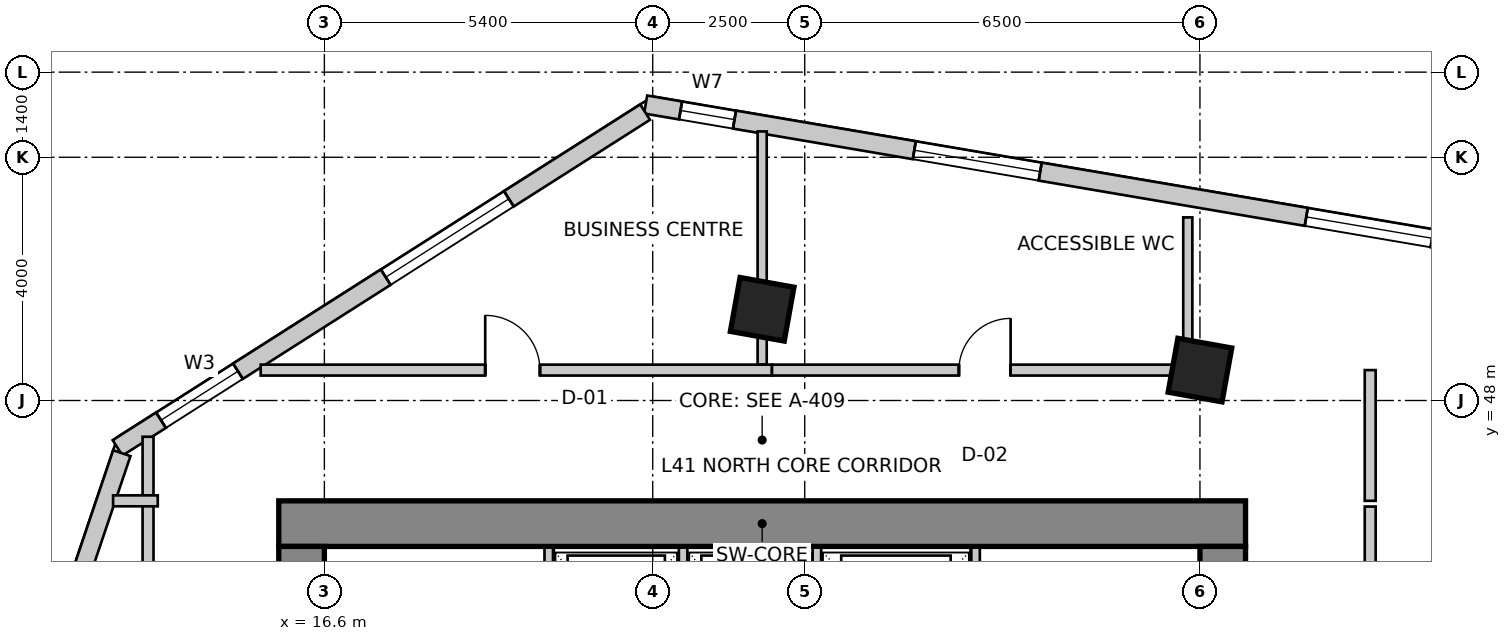
"""IFC4 building model, lengths in metres.
Left out: names, types, materials, properties, quantities, classifications, styles, units other than length and angle.
Written with IfcOpenShell. Run it as: python <this file> out.ifc"""

import sys

from ifc_helpers import new_model, si_unit, direction, frame, frame_2d, origin, origin_2d, place, context, subcontext, project, spatial, rectangle, extrude, source, transform, mapped, element, fill, save


model = new_model("IFC4")
c1 = context("Model", 3, precision=1e-05, world=origin(), true_north=direction((0.0, 1.0)))
c2 = subcontext(c1, "Body", "Model", "MODEL_VIEW")
j1 = project(units=[si_unit("LENGTHUNIT", "METRE"), si_unit("PLANEANGLEUNIT", "RADIAN")], contexts=[c1])
p1 = place(None, origin())
s1 = spatial("IfcSite", under=j1, at=p1, CompositionType="ELEMENT")
p2 = place(p1, origin())
s2 = spatial("IfcBuilding", under=s1, at=p2, CompositionType="ELEMENT")
p3 = place(p2, frame((0.0, 0.0, 164.6)))
s3 = spatial("IfcBuildingStorey", under=s2, at=p3, CompositionType="ELEMENT", Elevation=164.6)
p4 = place(p3, frame((15.85, 45.975, 0.0), z_axis=(0.0, 0.0, 1.0), x_axis=(1.0, 0.0, 0.0)))
e1 = element("IfcWall", 1, at=p4, inside=s3, PredefinedType="SHEAR", context=c2, shape_type="SweptSolid", body=[
    extrude(rectangle(XDim=15.9, YDim=0.75, at=frame_2d((7.95, 0.0))), origin(), (0.0, 0.0, 1.0), 3.6),
])
p5 = place(p3, frame((16.225, 34.2, 0.0), z_axis=(0.0, 0.0, 1.0), x_axis=(0.0, 1.0, 0.0)))
e2 = element("IfcWall", 2, at=p5, inside=s3, PredefinedType="SHEAR", context=c2, shape_type="SweptSolid", body=[
    extrude(rectangle(XDim=11.4, YDim=0.75, at=frame_2d((5.7, 0.0))), origin(), (0.0, 0.0, 1.0), 3.6),
])
m1 = source(origin(), c2, "Body", "SweptSolid", [
    extrude(rectangle(XDim=1.1, YDim=2.15, at=frame_2d((0.55, 1.075))), frame((0.0, 0.385, 0.0), z_axis=(0.0, -1.0, 0.0), x_axis=(1.0, 0.0, 0.0)), (0.0, 0.0, 1.0), 0.77),
])
p6 = place(p5, frame((7.15, 0.0, 0.0)))
e3 = element("IfcOpeningElement", 3, at=p6, cuts=e2, PredefinedType="OPENING", context=c2, shape_type="MappedRepresentation", body=[
    mapped(m1, transform((0.0, 0.0, 0.0), scale=1.0)),
])
p7 = place(p3, frame((31.375, 34.2, 0.0), z_axis=(0.0, 0.0, 1.0), x_axis=(0.0, 1.0, 0.0)))
e4 = element("IfcWall", 4, at=p7, inside=s3, PredefinedType="SHEAR", context=c2, shape_type="SweptSolid", body=[
    extrude(rectangle(XDim=11.4, YDim=0.75, at=frame_2d((5.7, 0.0))), origin(), (0.0, 0.0, 1.0), 3.6),
])
p8 = place(p7, frame((7.35, 0.0, 0.0)))
e5 = element("IfcOpeningElement", 5, at=p8, cuts=e4, PredefinedType="OPENING", context=c2, shape_type="MappedRepresentation", body=[
    mapped(m1, transform((0.0, 0.0, 0.0), scale=1.0)),
])
m2 = source(origin(), c2, "Body", "SweptSolid", [
    extrude(rectangle(XDim=0.9, YDim=0.9, at=origin_2d()), origin(), (0.0, 0.0, 1.0), 3.6),
])
for number, where, z_axis, x_axis in (
    (6, (23.8, 49.5, 0.0), (0.0, 0.0, 1.0), (0.984, -0.177, 0.0)),
    (7, (31.0, 48.5, 0.0), (0.0, 0.0, 1.0), (0.984, -0.177, 0.0)),
):
    element("IfcColumn", number, at=place(p3, frame(where, z_axis=z_axis, x_axis=x_axis)), inside=s3, PredefinedType="COLUMN", context=c2, shape_type="MappedRepresentation", body=[
        mapped(m2, transform((0.0, 0.0, 0.0), scale=1.0)),
    ])
p9 = place(p3, frame((53.561, 47.48, 0.0), z_axis=(0.0, 0.0, 1.0), x_axis=(-0.985845173895, 0.167658262868, 0.0)))
e8 = element("IfcWall", 8, at=p9, inside=s3, PredefinedType="SOLIDWALL", context=c2, shape_type="SweptSolid", body=[
    extrude(rectangle(XDim=32.132, YDim=0.3, at=frame_2d((16.066, 0.0))), origin(), (0.0, 0.0, 1.0), 3.35),
])
m3 = source(origin(), c2, "Body", "SweptSolid", [
    extrude(rectangle(XDim=2.1, YDim=2.0, at=frame_2d((1.05, 1.0))), frame((0.0, 0.16, 0.0), z_axis=(0.0, -1.0, 0.0), x_axis=(1.0, 0.0, 0.0)), (0.0, 0.0, 1.0), 0.32),
])
p10 = place(p9, frame((2.046, 0.0, 0.85)))
e9 = element("IfcOpeningElement", 9, at=p10, cuts=e8, PredefinedType="OPENING", context=c2, shape_type="MappedRepresentation", body=[
    mapped(m3, transform((0.0, 0.0, 0.0), scale=1.0)),
])
p11 = place(p9, frame((8.013, 0.0, 0.85)))
e10 = element("IfcOpeningElement", 10, at=p11, cuts=e8, PredefinedType="OPENING", context=c2, shape_type="MappedRepresentation", body=[
    mapped(m3, transform((0.0, 0.0, 0.0), scale=1.0)),
])
m4 = source(origin(), c2, "Body", "SweptSolid", [
    extrude(rectangle(XDim=2.4, YDim=2.2, at=frame_2d((1.2, 1.1))), frame((0.0, 0.16, 0.0), z_axis=(0.0, -1.0, 0.0), x_axis=(1.0, 0.0, 0.0)), (0.0, 0.0, 1.0), 0.32),
])
p12 = place(p9, frame((13.362, 0.0, 0.85)))
e11 = element("IfcOpeningElement", 11, at=p12, cuts=e8, PredefinedType="OPENING", context=c2, shape_type="MappedRepresentation", body=[
    mapped(m4, transform((0.0, 0.0, 0.0), scale=1.0)),
])
p13 = place(p9, frame((19.011, 0.0, 0.85)))
e12 = element("IfcOpeningElement", 12, at=p13, cuts=e8, PredefinedType="OPENING", context=c2, shape_type="MappedRepresentation", body=[
    mapped(m3, transform((0.0, 0.0, 0.0), scale=1.0)),
])
p14 = place(p9, frame((25.55, 0.0, 0.85)))
e13 = element("IfcOpeningElement", 13, at=p14, cuts=e8, PredefinedType="OPENING", context=c2, shape_type="MappedRepresentation", body=[
    mapped(m3, transform((0.0, 0.0, 0.0), scale=1.0)),
])
m5 = source(origin(), c2, "Body", "SweptSolid", [
    extrude(rectangle(XDim=0.9, YDim=1.6, at=frame_2d((0.45, 0.8))), frame((0.0, 0.16, 0.0), z_axis=(0.0, -1.0, 0.0), x_axis=(1.0, 0.0, 0.0)), (0.0, 0.0, 1.0), 0.32),
])
p15 = place(p9, frame((30.65, 0.0, 0.85)))
e14 = element("IfcOpeningElement", 14, at=p15, cuts=e8, PredefinedType="OPENING", context=c2, shape_type="MappedRepresentation", body=[
    mapped(m5, transform((0.0, 0.0, 0.0), scale=1.0)),
])
p16 = place(p3, frame((21.875, 52.742, 0.0), z_axis=(0.0, 0.0, 1.0), x_axis=(-0.843662465249, -0.536873956092, 0.0)))
e15 = element("IfcWall", 15, at=p16, inside=s3, PredefinedType="SOLIDWALL", context=c2, shape_type="SweptSolid", body=[
    extrude(rectangle(XDim=10.284, YDim=0.3, at=frame_2d((5.142, 0.0))), origin(), (0.0, 0.0, 1.0), 3.35),
])
p17 = place(p16, frame((2.656, 0.0, 0.85)))
e16 = element("IfcOpeningElement", 16, at=p17, cuts=e15, PredefinedType="OPENING", context=c2, shape_type="MappedRepresentation", body=[
    mapped(m4, transform((0.0, 0.0, 0.0), scale=1.0)),
])
m6 = source(origin(), c2, "Body", "SweptSolid", [
    extrude(rectangle(XDim=1.5, YDim=1.8, at=frame_2d((0.75, 0.9))), frame((0.0, 0.16, 0.0), z_axis=(0.0, -1.0, 0.0), x_axis=(1.0, 0.0, 0.0)), (0.0, 0.0, 1.0), 0.32),
])
p18 = place(p16, frame((7.937, 0.0, 0.85)))
e17 = element("IfcOpeningElement", 17, at=p18, cuts=e15, PredefinedType="OPENING", context=c2, shape_type="MappedRepresentation", body=[
    mapped(m6, transform((0.0, 0.0, 0.0), scale=1.0)),
])
p19 = place(p3, frame((13.269, 47.134, 0.0), z_axis=(0.0, 0.0, 1.0), x_axis=(-0.319929773322, -0.947441259468, 0.0)))
e18 = element("IfcWall", 18, at=p19, inside=s3, PredefinedType="SOLIDWALL", context=c2, shape_type="SweptSolid", body=[
    extrude(rectangle(XDim=16.134, YDim=0.3, at=frame_2d((8.067, 0.0))), origin(), (0.0, 0.0, 1.0), 3.35),
])
p20 = place(p19, frame((2.426, 0.0, 0.85)))
e19 = element("IfcOpeningElement", 19, at=p20, cuts=e18, PredefinedType="OPENING", context=c2, shape_type="MappedRepresentation", body=[
    mapped(m3, transform((0.0, 0.0, 0.0), scale=1.0)),
])
p21 = place(p19, frame((7.211, 0.0, 0.85)))
e20 = element("IfcOpeningElement", 20, at=p21, cuts=e18, PredefinedType="OPENING", context=c2, shape_type="MappedRepresentation", body=[
    mapped(m4, transform((0.0, 0.0, 0.0), scale=1.0)),
])
p22 = place(p19, frame((12.296, 0.0, 0.85)))
e21 = element("IfcOpeningElement", 21, at=p22, cuts=e18, PredefinedType="OPENING", context=c2, shape_type="MappedRepresentation", body=[
    mapped(m3, transform((0.0, 0.0, 0.0), scale=1.0)),
])
for number, where, z_axis, x_axis in (
    (22, (20.29, 43.28, 0.0), (0.0, 0.0, 1.0), (0.0, 1.0, 0.0)),
    (23, (27.31, 43.28, 0.0), (0.0, 0.0, 1.0), (0.0, 1.0, 0.0)),
):
    element("IfcWall", number, at=place(p3, frame(where, z_axis=z_axis, x_axis=x_axis)), inside=s3, PredefinedType="SOLIDWALL", context=c2, shape_type="SweptSolid", body=[
        extrude(rectangle(XDim=2.3, YDim=0.14, at=frame_2d((1.15, 0.0))), origin(), (0.0, 0.0, 1.0), 3.35),
    ])
for number, where, z_axis, x_axis in (
    (24, (22.5, 43.02, 0.0), (0.0, 0.0, 1.0), (0.0, 1.0, 0.0)),
    (25, (24.7, 43.02, 0.0), (0.0, 0.0, 1.0), (0.0, 1.0, 0.0)),
):
    element("IfcWall", number, at=place(p3, frame(where, z_axis=z_axis, x_axis=x_axis)), inside=s3, PredefinedType="SOLIDWALL", context=c2, shape_type="SweptSolid", body=[
        extrude(rectangle(XDim=2.56, YDim=0.14, at=frame_2d((1.28, 0.0))), origin(), (0.0, 0.0, 1.0), 3.35),
    ])
p23 = place(p3, frame((13.7, 33.544, 0.0), z_axis=(0.0, 0.0, 1.0), x_axis=(0.0, 1.0, 0.0)))
e26 = element("IfcWall", 26, at=p23, inside=s3, PredefinedType="PARTITIONING", context=c2, shape_type="SweptSolid", body=[
    extrude(rectangle(XDim=13.86, YDim=0.18, at=frame_2d((6.93, 0.0))), origin(), (0.0, 0.0, 1.0), 2.492),
])
m7 = source(origin(), c2, "Body", "SweptSolid", [
    extrude(rectangle(XDim=0.9, YDim=2.15, at=frame_2d((0.45, 1.075))), frame((0.0, 0.1, 0.0), z_axis=(0.0, -1.0, 0.0), x_axis=(1.0, 0.0, 0.0)), (0.0, 0.0, 1.0), 0.2),
])
p24 = place(p23, frame((4.253, 0.0, 0.0)))
e27 = element("IfcOpeningElement", 27, at=p24, cuts=e26, PredefinedType="OPENING", context=c2, shape_type="MappedRepresentation", body=[
    mapped(m7, transform((0.0, 0.0, 0.0), scale=1.0)),
])
p25 = place(p3, frame((13.86, 46.35, 0.0), z_axis=(0.0, 0.0, 1.0), x_axis=(-1.0, 0.0, 0.0)))
e28 = element("IfcWall", 28, at=p25, inside=s3, PredefinedType="PARTITIONING", context=c2, shape_type="SweptSolid", body=[
    extrude(rectangle(XDim=0.735, YDim=0.18, at=frame_2d((0.367, 0.0))), origin(), (0.0, 0.0, 1.0), 3.35),
])
p26 = place(p3, frame((15.552, 48.5, 0.0), z_axis=(0.0, 0.0, 1.0), x_axis=(1.0, 0.0, 0.0)))
e29 = element("IfcWall", 29, at=p26, inside=s3, PredefinedType="PARTITIONING", context=c2, shape_type="SweptSolid", body=[
    extrude(rectangle(XDim=8.407, YDim=0.18, at=frame_2d((4.204, 0.0))), origin(), (0.0, 0.0, 1.0), 3.034),
])
p27 = place(p26, frame((3.693, 0.0, 0.0)))
e30 = element("IfcOpeningElement", 30, at=p27, cuts=e29, PredefinedType="OPENING", context=c2, shape_type="MappedRepresentation", body=[
    mapped(m7, transform((0.0, 0.0, 0.0), scale=1.0)),
])
p28 = place(p3, frame((23.962, 48.5, 0.0), z_axis=(0.0, 0.0, 1.0), x_axis=(1.0, 0.0, 0.0)))
e31 = element("IfcWall", 31, at=p28, inside=s3, PredefinedType="PARTITIONING", context=c2, shape_type="SweptSolid", body=[
    extrude(rectangle(XDim=6.998, YDim=0.18, at=frame_2d((3.499, 0.0))), origin(), (0.0, 0.0, 1.0), 2.492),
])
m8 = source(origin(), c2, "Body", "SweptSolid", [
    extrude(rectangle(XDim=0.85, YDim=2.15, at=frame_2d((0.425, 1.075))), frame((0.0, 0.1, 0.0), z_axis=(0.0, -1.0, 0.0), x_axis=(1.0, 0.0, 0.0)), (0.0, 0.0, 1.0), 0.2),
])
p29 = place(p28, frame((3.074, 0.0, 0.0)))
e32 = element("IfcOpeningElement", 32, at=p29, cuts=e31, PredefinedType="OPENING", context=c2, shape_type="MappedRepresentation", body=[
    mapped(m8, transform((0.0, 0.0, 0.0), scale=1.0)),
])
p30 = place(p3, frame((33.8, 48.5, 0.0), z_axis=(0.0, 0.0, 1.0), x_axis=(0.0, -1.0, 0.0)))
e33 = element("IfcWall", 33, at=p30, inside=s3, PredefinedType="PARTITIONING", context=c2, shape_type="SweptSolid", body=[
    extrude(rectangle(XDim=2.15, YDim=0.18, at=frame_2d((1.075, 0.0))), origin(), (0.0, 0.0, 1.0), 2.492),
])
p31 = place(p3, frame((33.8, 46.256, 0.0), z_axis=(0.0, 0.0, 1.0), x_axis=(0.0, -1.0, 0.0)))
e34 = element("IfcWall", 34, at=p31, inside=s3, PredefinedType="PARTITIONING", context=c2, shape_type="SweptSolid", body=[
    extrude(rectangle(XDim=7.916, YDim=0.18, at=frame_2d((3.958, 0.0))), origin(), (0.0, 0.0, 1.0), 2.922),
])
m9 = source(origin(), c2, "Body", "SweptSolid", [
    extrude(rectangle(XDim=1.6, YDim=2.15, at=frame_2d((0.8, 1.075))), frame((0.0, 0.1, 0.0), z_axis=(0.0, -1.0, 0.0), x_axis=(1.0, 0.0, 0.0)), (0.0, 0.0, 1.0), 0.2),
])
p32 = place(p31, frame((3.097, 0.0, 0.0)))
e35 = element("IfcOpeningElement", 35, at=p32, cuts=e34, PredefinedType="OPENING", context=c2, shape_type="MappedRepresentation", body=[
    mapped(m9, transform((0.0, 0.0, 0.0), scale=1.0)),
])
p33 = place(p3, frame((23.8, 52.425, 0.0), z_axis=(0.0, 0.0, 1.0), x_axis=(0.0, -1.0, 0.0)))
e36 = element("IfcWall", 36, at=p33, inside=s3, PredefinedType="PARTITIONING", context=c2, shape_type="SweptSolid", body=[
    extrude(rectangle(XDim=3.831, YDim=0.15, at=frame_2d((1.916, 0.0))), origin(), (0.0, 0.0, 1.0), 2.492),
])
p34 = place(p3, frame((30.8, 51.011, 0.0), z_axis=(0.0, 0.0, 1.0), x_axis=(0.0, -1.0, 0.0)))
e37 = element("IfcWall", 37, at=p34, inside=s3, PredefinedType="PARTITIONING", context=c2, shape_type="SweptSolid", body=[
    extrude(rectangle(XDim=2.292, YDim=0.15, at=frame_2d((1.146, 0.0))), origin(), (0.0, 0.0, 1.0), 3.35),
])
m10 = source(origin(), c2, "Body", "SweptSolid", [
    extrude(rectangle(XDim=2.1, YDim=2.0, at=frame_2d((1.05, 1.0))), frame((0.0, -0.015, 0.0), z_axis=(0.0, -1.0, 0.0), x_axis=(1.0, 0.0, 0.0)), (0.0, 0.0, 1.0), 0.06),
])
p35 = place(p13, origin())
e38 = element("IfcWindow", 38, at=p35, inside=s3, PartitioningType="SINGLE_PANEL", PredefinedType="WINDOW", context=c2, shape_type="MappedRepresentation", body=[
    mapped(m10, transform((0.0, 0.0, 0.0), scale=1.0)),
])
fill(e12, e38)
p36 = place(p14, origin())
e39 = element("IfcWindow", 39, at=p36, inside=s3, PartitioningType="SINGLE_PANEL", PredefinedType="WINDOW", context=c2, shape_type="MappedRepresentation", body=[
    mapped(m10, transform((0.0, 0.0, 0.0), scale=1.0)),
])
fill(e13, e39)
m11 = source(origin(), c2, "Body", "SweptSolid", [
    extrude(rectangle(XDim=0.9, YDim=1.6, at=frame_2d((0.45, 0.8))), frame((0.0, -0.015, 0.0), z_axis=(0.0, -1.0, 0.0), x_axis=(1.0, 0.0, 0.0)), (0.0, 0.0, 1.0), 0.06),
])
p37 = place(p15, origin())
e40 = element("IfcWindow", 40, at=p37, inside=s3, PartitioningType="SINGLE_PANEL", PredefinedType="WINDOW", context=c2, shape_type="MappedRepresentation", body=[
    mapped(m11, transform((0.0, 0.0, 0.0), scale=1.0)),
])
fill(e14, e40)
m12 = source(origin(), c2, "Body", "SweptSolid", [
    extrude(rectangle(XDim=2.4, YDim=2.2, at=frame_2d((1.2, 1.1))), frame((0.0, -0.015, 0.0), z_axis=(0.0, -1.0, 0.0), x_axis=(1.0, 0.0, 0.0)), (0.0, 0.0, 1.0), 0.06),
])
p38 = place(p17, origin())
e41 = element("IfcWindow", 41, at=p38, inside=s3, PartitioningType="SINGLE_PANEL", PredefinedType="WINDOW", context=c2, shape_type="MappedRepresentation", body=[
    mapped(m12, transform((0.0, 0.0, 0.0), scale=1.0)),
])
fill(e16, e41)
m13 = source(origin(), c2, "Body", "SweptSolid", [
    extrude(rectangle(XDim=1.5, YDim=1.8, at=frame_2d((0.75, 0.9))), frame((0.0, -0.015, 0.0), z_axis=(0.0, -1.0, 0.0), x_axis=(1.0, 0.0, 0.0)), (0.0, 0.0, 1.0), 0.06),
])
p39 = place(p18, origin())
e42 = element("IfcWindow", 42, at=p39, inside=s3, PartitioningType="SINGLE_PANEL", PredefinedType="WINDOW", context=c2, shape_type="MappedRepresentation", body=[
    mapped(m13, transform((0.0, 0.0, 0.0), scale=1.0)),
])
fill(e17, e42)
m14 = source(origin(), c2, "Body", "SweptSolid", [
    extrude(rectangle(XDim=0.9, YDim=2.15, at=frame_2d((0.45, 1.075))), frame((0.0, 0.025, 0.0), z_axis=(0.0, -1.0, 0.0), x_axis=(1.0, 0.0, 0.0)), (0.0, 0.0, 1.0), 0.05),
])
p40 = place(p27, origin())
e43 = element("IfcDoor", 43, at=p40, inside=s3, OperationType="SINGLE_SWING_LEFT", PredefinedType="DOOR", context=c2, shape_type="MappedRepresentation", body=[
    mapped(m14, transform((0.0, 0.0, 0.0), scale=1.0)),
])
fill(e30, e43)
m15 = source(origin(), c2, "Body", "SweptSolid", [
    extrude(rectangle(XDim=0.85, YDim=2.15, at=frame_2d((0.425, 1.075))), frame((0.0, 0.025, 0.0), z_axis=(0.0, -1.0, 0.0), x_axis=(1.0, 0.0, 0.0)), (0.0, 0.0, 1.0), 0.05),
])
p41 = place(p29, origin())
e44 = element("IfcDoor", 44, at=p41, inside=s3, OperationType="SINGLE_SWING_RIGHT", PredefinedType="DOOR", context=c2, shape_type="MappedRepresentation", body=[
    mapped(m15, transform((0.0, 0.0, 0.0), scale=1.0)),
])
fill(e32, e44)
save(model, sys.argv[1])
